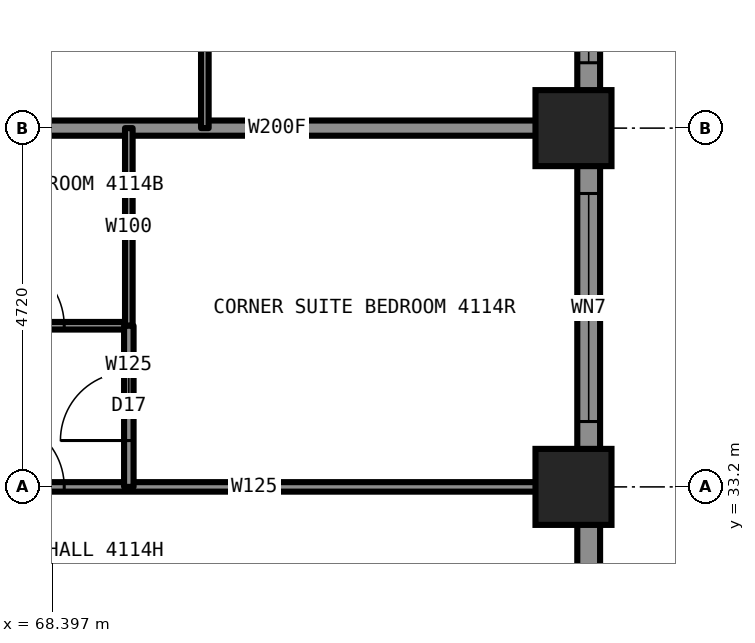
"""IFC4 building model, lengths in metres.
Left out: names, types, materials, properties, quantities, classifications, styles, units other than length and angle.
Written with IfcOpenShell. Run it as: python <this file> out.ifc"""

import sys

from ifc_helpers import new_model, si_unit, direction, frame, frame_2d, origin, origin_2d, place, context, subcontext, project, spatial, rectangle, i_section, extrude, element, fill, save


model = new_model("IFC4")
c1 = context("Model", 3, precision=1e-05, world=origin(), true_north=direction((0.0, 1.0)))
c2 = subcontext(c1, "Body", "Model", "MODEL_VIEW")
j1 = project(units=[si_unit("LENGTHUNIT", "METRE"), si_unit("PLANEANGLEUNIT", "RADIAN")], contexts=[c1])
p1 = place(None, origin())
s1 = spatial("IfcSite", under=j1, at=p1, CompositionType="ELEMENT")
p2 = place(p1, origin())
s2 = spatial("IfcBuilding", under=s1, at=p2, CompositionType="ELEMENT")
p3 = place(p2, frame((0.0, 0.0, 145.9)))
s3 = spatial("IfcBuildingStorey", under=s2, at=p3, CompositionType="ELEMENT", Elevation=145.9)
for number, where, z_axis, x_axis in (
    (1, (75.25, 33.2, 0.0), (0.0, 0.0, 1.0), (1.0, 0.0, 0.0)),
    (2, (75.25, 37.92, 0.0), (0.0, 0.0, 1.0), (1.0, 0.0, 0.0)),
):
    element("IfcColumn", number, at=place(p3, frame(where, z_axis=z_axis, x_axis=x_axis)), inside=s3, PredefinedType="COLUMN", context=c2, shape_type="SweptSolid", body=[
        extrude(i_section(OverallWidth=0.422, OverallDepth=0.465, WebThickness=0.045, FlangeThickness=0.073, at=origin_2d()), origin(), (0.0, 0.0, 1.0), 3.5),
    ])
p4 = place(p3, frame((66.8, 33.2, 0.0), z_axis=(0.0, 0.0, 1.0), x_axis=(1.0, 0.0, 0.0)))
e3 = element("IfcWall", 3, at=p4, inside=s3, PredefinedType="PARTITIONING", context=c2, shape_type="SweptSolid", body=[
    extrude(rectangle(XDim=8.5, YDim=0.125, at=frame_2d((4.25, 0.0))), origin(), (0.0, 0.0, 1.0), 2.573),
])
p5 = place(p4, frame((0.85, 0.0, 0.0)))
e4 = element("IfcOpeningElement", 4, at=p5, cuts=e3, PredefinedType="OPENING", context=c2, shape_type="SweptSolid", body=[
    extrude(rectangle(XDim=0.9, YDim=2.2, at=frame_2d((0.45, 1.1))), frame((0.0, 0.073, 0.0), z_axis=(0.0, -1.0, 0.0), x_axis=(1.0, 0.0, 0.0)), (0.0, 0.0, 1.0), 0.145),
])
p6 = place(p3, frame((66.8, 37.92, 0.0), z_axis=(0.0, 0.0, 1.0), x_axis=(1.0, 0.0, 0.0)))
e5 = element("IfcWall", 5, at=p6, inside=s3, PredefinedType="PARTITIONING", context=c2, shape_type="SweptSolid", body=[
    extrude(rectangle(XDim=8.5, YDim=0.2, at=frame_2d((4.25, 0.0))), origin(), (0.0, 0.0, 1.0), 2.573),
])
p7 = place(p3, frame((66.8, 35.32, 0.0), z_axis=(0.0, 0.0, 1.0), x_axis=(1.0, 0.0, 0.0)))
e6 = element("IfcWall", 6, at=p7, inside=s3, PredefinedType="PARTITIONING", context=c2, shape_type="SweptSolid", body=[
    extrude(rectangle(XDim=2.6, YDim=0.1, at=frame_2d((1.3, 0.0))), origin(), (0.0, 0.0, 1.0), 3.33),
])
p8 = place(p7, frame((0.85, 0.0, 0.0)))
e7 = element("IfcOpeningElement", 7, at=p8, cuts=e6, PredefinedType="OPENING", context=c2, shape_type="SweptSolid", body=[
    extrude(rectangle(XDim=0.9, YDim=2.1, at=frame_2d((0.45, 1.05))), frame((0.0, 0.06, 0.0), z_axis=(0.0, -1.0, 0.0), x_axis=(1.0, 0.0, 0.0)), (0.0, 0.0, 1.0), 0.12),
])
p9 = place(p3, frame((69.4, 35.32, 0.0), z_axis=(0.0, 0.0, 1.0), x_axis=(0.0, 1.0, 0.0)))
e8 = element("IfcWall", 8, at=p9, inside=s3, PredefinedType="PARTITIONING", context=c2, shape_type="SweptSolid", body=[
    extrude(rectangle(XDim=2.6, YDim=0.1, at=frame_2d((1.3, 0.0))), origin(), (0.0, 0.0, 1.0), 3.33),
])
p10 = place(p3, frame((69.4, 33.2, 0.0), z_axis=(0.0, 0.0, 1.0), x_axis=(0.0, 1.0, 0.0)))
e9 = element("IfcWall", 9, at=p10, inside=s3, PredefinedType="PARTITIONING", context=c2, shape_type="SweptSolid", body=[
    extrude(rectangle(XDim=2.12, YDim=0.125, at=frame_2d((1.06, 0.0))), origin(), (0.0, 0.0, 1.0), 3.33),
])
p11 = place(p10, frame((0.61, 0.0, 0.0)))
e10 = element("IfcOpeningElement", 10, at=p11, cuts=e9, PredefinedType="OPENING", context=c2, shape_type="SweptSolid", body=[
    extrude(rectangle(XDim=0.9, YDim=2.2, at=frame_2d((0.45, 1.1))), frame((0.0, 0.073, 0.0), z_axis=(0.0, -1.0, 0.0), x_axis=(1.0, 0.0, 0.0)), (0.0, 0.0, 1.0), 0.145),
])
p12 = place(p3, frame((69.8, 37.92, 0.0), z_axis=(0.0, 0.0, 1.0), x_axis=(0.0, 1.0, 0.0)))
e11 = element("IfcWall", 11, at=p12, inside=s3, PredefinedType="PARTITIONING", context=c2, shape_type="SweptSolid", body=[
    extrude(rectangle(XDim=2.9, YDim=0.1, at=frame_2d((1.45, 0.0))), origin(), (0.0, 0.0, 1.0), 3.33),
])
p13 = place(p3, frame((75.45, 29.9, 0.0), z_axis=(0.0, 0.0, 1.0), x_axis=(0.0, 1.0, 0.0)))
e12 = element("IfcWall", 12, at=p13, inside=s3, PredefinedType="SOLIDWALL", context=c2, shape_type="SweptSolid", body=[
    extrude(rectangle(XDim=30.2, YDim=0.3, at=frame_2d((15.1, 0.0))), origin(), (0.0, 0.0, 1.0), 2.83),
])
p14 = place(p13, frame((1.3, 0.0, 0.8)))
e13 = element("IfcOpeningElement", 13, at=p14, cuts=e12, PredefinedType="OPENING", context=c2, shape_type="SweptSolid", body=[
    extrude(rectangle(XDim=1.1, YDim=1.7, at=frame_2d((0.55, 0.85))), frame((0.0, 0.16, 0.0), z_axis=(0.0, -1.0, 0.0), x_axis=(1.0, 0.0, 0.0)), (0.0, 0.0, 1.0), 0.32),
])
p15 = place(p13, frame((4.16, 0.0, 0.5)))
e14 = element("IfcOpeningElement", 14, at=p15, cuts=e12, PredefinedType="OPENING", context=c2, shape_type="SweptSolid", body=[
    extrude(rectangle(XDim=3.0, YDim=2.0, at=frame_2d((1.5, 1.0))), frame((0.0, 0.16, 0.0), z_axis=(0.0, -1.0, 0.0), x_axis=(1.0, 0.0, 0.0)), (0.0, 0.0, 1.0), 0.32),
])
p16 = place(p13, frame((8.88, 0.0, 0.5)))
e15 = element("IfcOpeningElement", 15, at=p16, cuts=e12, PredefinedType="OPENING", context=c2, shape_type="SweptSolid", body=[
    extrude(rectangle(XDim=3.0, YDim=2.0, at=frame_2d((1.5, 1.0))), frame((0.0, 0.16, 0.0), z_axis=(0.0, -1.0, 0.0), x_axis=(1.0, 0.0, 0.0)), (0.0, 0.0, 1.0), 0.32),
])
p17 = place(p13, frame((13.6, 0.0, 0.5)))
e16 = element("IfcOpeningElement", 16, at=p17, cuts=e12, PredefinedType="OPENING", context=c2, shape_type="SweptSolid", body=[
    extrude(rectangle(XDim=3.0, YDim=2.0, at=frame_2d((1.5, 1.0))), frame((0.0, 0.16, 0.0), z_axis=(0.0, -1.0, 0.0), x_axis=(1.0, 0.0, 0.0)), (0.0, 0.0, 1.0), 0.32),
])
p18 = place(p13, frame((18.32, 0.0, 0.5)))
e17 = element("IfcOpeningElement", 17, at=p18, cuts=e12, PredefinedType="OPENING", context=c2, shape_type="SweptSolid", body=[
    extrude(rectangle(XDim=3.0, YDim=2.0, at=frame_2d((1.5, 1.0))), frame((0.0, 0.16, 0.0), z_axis=(0.0, -1.0, 0.0), x_axis=(1.0, 0.0, 0.0)), (0.0, 0.0, 1.0), 0.32),
])
p19 = place(p13, frame((23.04, 0.0, 0.5)))
e18 = element("IfcOpeningElement", 18, at=p19, cuts=e12, PredefinedType="OPENING", context=c2, shape_type="SweptSolid", body=[
    extrude(rectangle(XDim=3.0, YDim=2.0, at=frame_2d((1.5, 1.0))), frame((0.0, 0.16, 0.0), z_axis=(0.0, -1.0, 0.0), x_axis=(1.0, 0.0, 0.0)), (0.0, 0.0, 1.0), 0.32),
])
p20 = place(p13, frame((27.75, 0.0, 0.8)))
e19 = element("IfcOpeningElement", 19, at=p20, cuts=e12, PredefinedType="OPENING", context=c2, shape_type="SweptSolid", body=[
    extrude(rectangle(XDim=1.1, YDim=1.7, at=frame_2d((0.55, 0.85))), frame((0.0, 0.16, 0.0), z_axis=(0.0, -1.0, 0.0), x_axis=(1.0, 0.0, 0.0)), (0.0, 0.0, 1.0), 0.32),
])
p21 = place(p5, origin())
e20 = element("IfcDoor", 20, at=p21, inside=s3, OperationType="SINGLE_SWING_LEFT", PredefinedType="DOOR", context=c2, shape_type="SweptSolid", body=[
    extrude(rectangle(XDim=0.9, YDim=2.2, at=frame_2d((0.45, 1.1))), frame((0.0, 0.025, 0.0), z_axis=(0.0, -1.0, 0.0), x_axis=(1.0, 0.0, 0.0)), (0.0, 0.0, 1.0), 0.05),
])
fill(e4, e20)
p22 = place(p8, origin())
e21 = element("IfcDoor", 21, at=p22, inside=s3, OperationType="SINGLE_SWING_RIGHT", PredefinedType="DOOR", context=c2, shape_type="SweptSolid", body=[
    extrude(rectangle(XDim=0.9, YDim=2.1, at=frame_2d((0.45, 1.05))), frame((0.0, 0.025, 0.0), z_axis=(0.0, -1.0, 0.0), x_axis=(1.0, 0.0, 0.0)), (0.0, 0.0, 1.0), 0.05),
])
fill(e7, e21)
p23 = place(p11, origin())
e22 = element("IfcDoor", 22, at=p23, inside=s3, OperationType="SINGLE_SWING_LEFT", PredefinedType="DOOR", context=c2, shape_type="SweptSolid", body=[
    extrude(rectangle(XDim=0.9, YDim=2.2, at=frame_2d((0.45, 1.1))), frame((0.0, 0.025, 0.0), z_axis=(0.0, -1.0, 0.0), x_axis=(1.0, 0.0, 0.0)), (0.0, 0.0, 1.0), 0.05),
])
fill(e10, e22)
p24 = place(p14, origin())
e23 = element("IfcWindow", 23, at=p24, inside=s3, PartitioningType="SINGLE_PANEL", PredefinedType="WINDOW", context=c2, shape_type="SweptSolid", body=[
    extrude(rectangle(XDim=1.1, YDim=1.7, at=frame_2d((0.55, 0.85))), frame((0.0, 0.03, 0.0), z_axis=(0.0, -1.0, 0.0), x_axis=(1.0, 0.0, 0.0)), (0.0, 0.0, 1.0), 0.06),
])
fill(e13, e23)
p25 = place(p15, origin())
e24 = element("IfcWindow", 24, at=p25, inside=s3, PartitioningType="SINGLE_PANEL", PredefinedType="WINDOW", context=c2, shape_type="SweptSolid", body=[
    extrude(rectangle(XDim=3.0, YDim=2.0, at=frame_2d((1.5, 1.0))), frame((0.0, 0.03, 0.0), z_axis=(0.0, -1.0, 0.0), x_axis=(1.0, 0.0, 0.0)), (0.0, 0.0, 1.0), 0.06),
])
fill(e14, e24)
p26 = place(p16, origin())
e25 = element("IfcWindow", 25, at=p26, inside=s3, PartitioningType="SINGLE_PANEL", PredefinedType="WINDOW", context=c2, shape_type="SweptSolid", body=[
    extrude(rectangle(XDim=3.0, YDim=2.0, at=frame_2d((1.5, 1.0))), frame((0.0, 0.03, 0.0), z_axis=(0.0, -1.0, 0.0), x_axis=(1.0, 0.0, 0.0)), (0.0, 0.0, 1.0), 0.06),
])
fill(e15, e25)
save(model, sys.argv[1])
